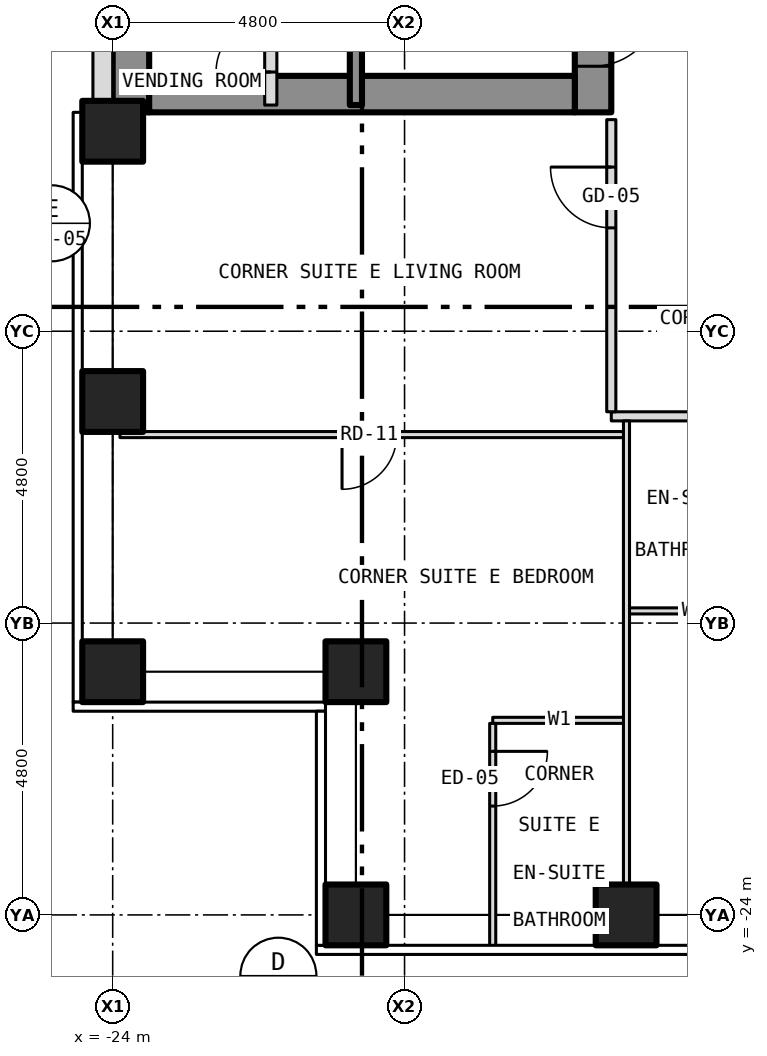
"""IFC4 building model, lengths in metres.
Left out: names, types, materials, properties, quantities, classifications, styles, units other than length and angle.
Written with IfcOpenShell. Run it as: python <this file> out.ifc"""

import sys

from ifc_helpers import new_model, si_unit, direction, frame, frame_2d, origin, origin_2d, place, context, subcontext, project, spatial, rectangle, hollow_rectangle, extrude, element, fill, save


model = new_model("IFC4")
c1 = context("Model", 3, precision=1e-05, world=origin(), true_north=direction((0.0, 1.0)))
c2 = subcontext(c1, "Body", "Model", "MODEL_VIEW")
j1 = project(units=[si_unit("LENGTHUNIT", "METRE"), si_unit("PLANEANGLEUNIT", "RADIAN")], contexts=[c1])
p1 = place(None, origin())
s1 = spatial("IfcSite", under=j1, at=p1, CompositionType="ELEMENT")
p2 = place(p1, origin())
s2 = spatial("IfcBuilding", under=s1, at=p2, CompositionType="ELEMENT")
p3 = place(p2, frame((0.0, 0.0, 60.0)))
s3 = spatial("IfcBuildingStorey", under=s2, at=p3, CompositionType="ELEMENT", Elevation=60.0)
for number, where, z_axis, x_axis in (
    (1, (-20.0, -24.0, -0.15), (0.0, 0.0, 1.0), (1.0, 0.0, 0.0)),
    (2, (-15.556, -24.0, -0.15), (0.0, 0.0, 1.0), (1.0, 0.0, 0.0)),
    (3, (-24.0, -20.0, -0.15), (0.0, 0.0, 1.0), (1.0, 0.0, 0.0)),
    (4, (-24.0, -15.556, -0.15), (0.0, 0.0, 1.0), (1.0, 0.0, 0.0)),
    (5, (-24.0, -11.111, -0.15), (0.0, 0.0, 1.0), (1.0, 0.0, 0.0)),
    (6, (-20.0, -20.0, -0.15), (0.0, 0.0, 1.0), (1.0, 0.0, 0.0)),
):
    element("IfcColumn", number, at=place(p3, frame(where, z_axis=z_axis, x_axis=x_axis)), inside=s3, PredefinedType="COLUMN", context=c2, shape_type="SweptSolid", body=[
        extrude(hollow_rectangle(XDim=1.0, YDim=1.0, WallThickness=0.06, at=origin_2d()), origin(), (0.0, 0.0, 1.0), 3.5),
    ])
p4 = place(p3, frame((-16.1, -10.8, 0.0), z_axis=(0.0, 0.0, 1.0), x_axis=(0.0, 1.0, 0.0)))
e7 = element("IfcWall", 7, at=p4, inside=s3, PredefinedType="SHEAR", context=c2, shape_type="SweptSolid", body=[
    extrude(rectangle(XDim=21.6, YDim=0.6, at=frame_2d((10.8, 0.0))), origin(), (0.0, 0.0, 1.0), 3.25),
])
p5 = place(p4, frame((9.4, 0.0, 0.0)))
e8 = element("IfcOpeningElement", 8, at=p5, cuts=e7, PredefinedType="OPENING", context=c2, shape_type="SweptSolid", body=[
    extrude(rectangle(XDim=1.1, YDim=2.1, at=frame_2d((0.55, 1.05))), frame((0.0, 0.312, 0.0), z_axis=(0.0, -1.0, 0.0), x_axis=(1.0, 0.0, 0.0)), (0.0, 0.0, 1.0), 0.624),
])
p6 = place(p4, frame((11.5, 0.0, 0.0)))
e9 = element("IfcOpeningElement", 9, at=p6, cuts=e7, PredefinedType="OPENING", context=c2, shape_type="SweptSolid", body=[
    extrude(rectangle(XDim=1.1, YDim=2.1, at=frame_2d((0.55, 1.05))), frame((0.0, 0.312, 0.0), z_axis=(0.0, -1.0, 0.0), x_axis=(1.0, 0.0, 0.0)), (0.0, 0.0, 1.0), 0.624),
])
p7 = place(p4, frame((13.6, 0.0, 0.0)))
e10 = element("IfcOpeningElement", 10, at=p7, cuts=e7, PredefinedType="OPENING", context=c2, shape_type="SweptSolid", body=[
    extrude(rectangle(XDim=1.1, YDim=2.1, at=frame_2d((0.55, 1.05))), frame((0.0, 0.312, 0.0), z_axis=(0.0, -1.0, 0.0), x_axis=(1.0, 0.0, 0.0)), (0.0, 0.0, 1.0), 0.624),
])
p8 = place(p4, frame((15.7, 0.0, 0.0)))
e11 = element("IfcOpeningElement", 11, at=p8, cuts=e7, PredefinedType="OPENING", context=c2, shape_type="SweptSolid", body=[
    extrude(rectangle(XDim=1.1, YDim=2.1, at=frame_2d((0.55, 1.05))), frame((0.0, 0.312, 0.0), z_axis=(0.0, -1.0, 0.0), x_axis=(1.0, 0.0, 0.0)), (0.0, 0.0, 1.0), 0.624),
])
p9 = place(p4, frame((17.8, 0.0, 0.0)))
e12 = element("IfcOpeningElement", 12, at=p9, cuts=e7, PredefinedType="OPENING", context=c2, shape_type="SweptSolid", body=[
    extrude(rectangle(XDim=1.1, YDim=2.1, at=frame_2d((0.55, 1.05))), frame((0.0, 0.312, 0.0), z_axis=(0.0, -1.0, 0.0), x_axis=(1.0, 0.0, 0.0)), (0.0, 0.0, 1.0), 0.624),
])
p10 = place(p4, frame((0.758, 0.0, 0.0)))
e13 = element("IfcOpeningElement", 13, at=p10, cuts=e7, PredefinedType="OPENING", context=c2, shape_type="SweptSolid", body=[
    extrude(rectangle(XDim=1.1, YDim=2.1, at=frame_2d((0.55, 1.05))), frame((0.0, 0.312, 0.0), z_axis=(0.0, -1.0, 0.0), x_axis=(1.0, 0.0, 0.0)), (0.0, 0.0, 1.0), 0.624),
])
p11 = place(p4, frame((7.5, 0.0, 0.0)))
e14 = element("IfcOpeningElement", 14, at=p11, cuts=e7, PredefinedType="OPENING", context=c2, shape_type="SweptSolid", body=[
    extrude(rectangle(XDim=1.1, YDim=2.1, at=frame_2d((0.55, 1.05))), frame((0.0, 0.312, 0.0), z_axis=(0.0, -1.0, 0.0), x_axis=(1.0, 0.0, 0.0)), (0.0, 0.0, 1.0), 0.624),
])
p12 = place(p3, frame((-23.7, -10.8, 0.0), z_axis=(0.0, 0.0, 1.0), x_axis=(0.0, 1.0, 0.0)))
e15 = element("IfcWall", 15, at=p12, inside=s3, PredefinedType="SHEAR", context=c2, shape_type="SweptSolid", body=[
    extrude(rectangle(XDim=21.6, YDim=0.6, at=frame_2d((10.8, 0.0))), origin(), (0.0, 0.0, 1.0), 3.25),
])
p13 = place(p3, frame((-23.4, -10.5, 0.0), z_axis=(0.0, 0.0, 1.0), x_axis=(1.0, 0.0, 0.0)))
e16 = element("IfcWall", 16, at=p13, inside=s3, PredefinedType="SHEAR", context=c2, shape_type="SweptSolid", body=[
    extrude(rectangle(XDim=7.0, YDim=0.6, at=frame_2d((3.5, 0.0))), origin(), (0.0, 0.0, 1.0), 3.25),
])
p14 = place(p3, frame((-24.163, 10.8, 0.0), z_axis=(0.0, 0.0, 1.0), x_axis=(0.0, -1.0, 0.0)))
e17 = element("IfcWall", 17, at=p14, inside=s3, PredefinedType="SOLIDWALL", context=c2, shape_type="SweptSolid", body=[
    extrude(rectangle(XDim=21.6, YDim=0.325, at=frame_2d((10.8, 0.0))), origin(), (0.0, 0.0, 1.0), 3.5),
])
p15 = place(p14, frame((18.05, 0.0, 1.0)))
e18 = element("IfcOpeningElement", 18, at=p15, cuts=e17, PredefinedType="OPENING", context=c2, shape_type="SweptSolid", body=[
    extrude(rectangle(XDim=0.6, YDim=1.5, at=frame_2d((0.3, 0.75))), frame((0.0, 0.175, 0.0), z_axis=(0.0, -1.0, 0.0), x_axis=(1.0, 0.0, 0.0)), (0.0, 0.0, 1.0), 0.349),
])
for number, where, z_axis, x_axis in (
    (19, (-17.75, -20.8, 0.0), (0.0, 0.0, 1.0), (1.0, 0.0, 0.0)),
    (20, (-15.55, -19.0, 0.0), (0.0, 0.0, 1.0), (1.0, 0.0, 0.0)),
):
    element("IfcWall", number, at=place(p3, frame(where, z_axis=z_axis, x_axis=x_axis)), inside=s3, PredefinedType="PARTITIONING", context=c2, shape_type="SweptSolid", body=[
        extrude(rectangle(XDim=2.2, YDim=0.1, at=frame_2d((1.1, 0.0))), origin(), (0.0, 0.0, 1.0), 3.35),
    ])
p16 = place(p3, frame((-23.88, -16.1, 0.0), z_axis=(0.0, 0.0, 1.0), x_axis=(1.0, 0.0, 0.0)))
e21 = element("IfcWall", 21, at=p16, inside=s3, PredefinedType="PARTITIONING", context=c2, shape_type="SweptSolid", body=[
    extrude(rectangle(XDim=8.33, YDim=0.1, at=frame_2d((4.165, 0.0))), origin(), (0.0, 0.0, 1.0), 3.35),
])
p17 = place(p16, frame((3.652, 0.0, 0.0)))
e22 = element("IfcOpeningElement", 22, at=p17, cuts=e21, PredefinedType="OPENING", context=c2, shape_type="SweptSolid", body=[
    extrude(rectangle(XDim=0.9, YDim=2.1, at=frame_2d((0.45, 1.05))), frame((0.0, 0.062, 0.0), z_axis=(0.0, -1.0, 0.0), x_axis=(1.0, 0.0, 0.0)), (0.0, 0.0, 1.0), 0.124),
])
p18 = place(p3, frame((-15.8, -15.8, 0.0), z_axis=(0.0, 0.0, 1.0), x_axis=(1.0, 0.0, 0.0)))
e23 = element("IfcWall", 23, at=p18, inside=s3, PredefinedType="PARTITIONING", context=c2, shape_type="SweptSolid", body=[
    extrude(rectangle(XDim=6.68, YDim=0.15, at=frame_2d((3.34, 0.0))), origin(), (0.0, 0.0, 1.0), 3.35),
])
p19 = place(p18, frame((4.047, 0.0, 0.0)))
e24 = element("IfcOpeningElement", 24, at=p19, cuts=e23, PredefinedType="OPENING", context=c2, shape_type="SweptSolid", body=[
    extrude(rectangle(XDim=1.0, YDim=2.1, at=frame_2d((0.5, 1.05))), frame((0.0, 0.087, 0.0), z_axis=(0.0, -1.0, 0.0), x_axis=(1.0, 0.0, 0.0)), (0.0, 0.0, 1.0), 0.174),
])
p20 = place(p3, frame((-21.4, -10.68, 0.0), z_axis=(0.0, 0.0, 1.0), x_axis=(0.0, 1.0, 0.0)))
e25 = element("IfcWall", 25, at=p20, inside=s3, PredefinedType="PARTITIONING", context=c2, shape_type="SweptSolid", body=[
    extrude(rectangle(XDim=8.68, YDim=0.2, at=frame_2d((4.34, 0.0))), origin(), (0.0, 0.0, 1.0), 3.25),
])
p21 = place(p20, frame((0.543, 0.0, 0.0)))
e26 = element("IfcOpeningElement", 26, at=p21, cuts=e25, PredefinedType="OPENING", context=c2, shape_type="SweptSolid", body=[
    extrude(rectangle(XDim=0.9, YDim=2.1, at=frame_2d((0.45, 1.05))), frame((0.0, 0.112, 0.0), z_axis=(0.0, -1.0, 0.0), x_axis=(1.0, 0.0, 0.0)), (0.0, 0.0, 1.0), 0.224),
])
p22 = place(p20, frame((4.993, 0.0, 0.0)))
e27 = element("IfcOpeningElement", 27, at=p22, cuts=e25, PredefinedType="OPENING", context=c2, shape_type="SweptSolid", body=[
    extrude(rectangle(XDim=0.9, YDim=2.1, at=frame_2d((0.45, 1.05))), frame((0.0, 0.112, 0.0), z_axis=(0.0, -1.0, 0.0), x_axis=(1.0, 0.0, 0.0)), (0.0, 0.0, 1.0), 0.224),
])
p23 = place(p3, frame((-20.0, -10.68, 0.0), z_axis=(0.0, 0.0, 1.0), x_axis=(0.0, 1.0, 0.0)))
e28 = element("IfcWall", 28, at=p23, inside=s3, PredefinedType="SHEAR", context=c2, shape_type="SweptSolid", body=[
    extrude(rectangle(XDim=6.98, YDim=0.2, at=frame_2d((3.49, 0.0))), origin(), (0.0, 0.0, 1.0), 3.25),
])
p24 = place(p3, frame((-17.75, -24.53, 0.0), z_axis=(0.0, 0.0, 1.0), x_axis=(0.0, 1.0, 0.0)))
e29 = element("IfcWall", 29, at=p24, inside=s3, PredefinedType="PARTITIONING", context=c2, shape_type="SweptSolid", body=[
    extrude(rectangle(XDim=3.68, YDim=0.1, at=frame_2d((1.84, 0.0))), origin(), (0.0, 0.0, 1.0), 3.35),
])
p25 = place(p24, frame((2.32, 0.0, 0.0)))
e30 = element("IfcOpeningElement", 30, at=p25, cuts=e29, PredefinedType="OPENING", context=c2, shape_type="SweptSolid", body=[
    extrude(rectangle(XDim=0.9, YDim=2.1, at=frame_2d((0.45, 1.05))), frame((0.0, 0.062, 0.0), z_axis=(0.0, -1.0, 0.0), x_axis=(1.0, 0.0, 0.0)), (0.0, 0.0, 1.0), 0.124),
])
p26 = place(p3, frame((-15.8, -15.725, 0.0), z_axis=(0.0, 0.0, 1.0), x_axis=(0.0, 1.0, 0.0)))
e31 = element("IfcWall", 31, at=p26, inside=s3, PredefinedType="PARTITIONING", context=c2, shape_type="SweptSolid", body=[
    extrude(rectangle(XDim=4.805, YDim=0.15, at=frame_2d((2.403, 0.0))), origin(), (0.0, 0.0, 1.0), 3.35),
])
p27 = place(p26, frame((3.025, 0.0, 0.0)))
e32 = element("IfcOpeningElement", 32, at=p27, cuts=e31, PredefinedType="OPENING", context=c2, shape_type="SweptSolid", body=[
    extrude(rectangle(XDim=1.0, YDim=2.1, at=frame_2d((0.5, 1.05))), frame((0.0, 0.087, 0.0), z_axis=(0.0, -1.0, 0.0), x_axis=(1.0, 0.0, 0.0)), (0.0, 0.0, 1.0), 0.174),
])
p28 = place(p3, frame((-15.55, -23.88, 0.0), z_axis=(0.0, 0.0, 1.0), x_axis=(0.0, 1.0, 0.0)))
e33 = element("IfcWall", 33, at=p28, inside=s3, PredefinedType="PARTITIONING", context=c2, shape_type="SweptSolid", body=[
    extrude(rectangle(XDim=8.005, YDim=0.1, at=frame_2d((4.002, 0.0))), origin(), (0.0, 0.0, 1.0), 3.35),
])
p29 = place(p10, origin())
e34 = element("IfcDoor", 34, at=p29, inside=s3, OperationType="SINGLE_SWING_RIGHT", PredefinedType="DOOR", context=c2, shape_type="SweptSolid", body=[
    extrude(rectangle(XDim=1.1, YDim=2.1, at=frame_2d((0.55, 1.05))), frame((0.0, 0.025, 0.0), z_axis=(0.0, -1.0, 0.0), x_axis=(1.0, 0.0, 0.0)), (0.0, 0.0, 1.0), 0.05),
])
fill(e13, e34)
p30 = place(p21, origin())
e35 = element("IfcDoor", 35, at=p30, inside=s3, OperationType="SINGLE_SWING_LEFT", PredefinedType="DOOR", context=c2, shape_type="SweptSolid", body=[
    extrude(rectangle(XDim=0.9, YDim=2.1, at=frame_2d((0.45, 1.05))), frame((0.0, 0.025, 0.0), z_axis=(0.0, -1.0, 0.0), x_axis=(1.0, 0.0, 0.0)), (0.0, 0.0, 1.0), 0.05),
])
fill(e26, e35)
p31 = place(p27, origin())
e36 = element("IfcDoor", 36, at=p31, inside=s3, OperationType="SINGLE_SWING_RIGHT", PredefinedType="DOOR", context=c2, shape_type="SweptSolid", body=[
    extrude(rectangle(XDim=1.0, YDim=2.1, at=frame_2d((0.5, 1.05))), frame((0.0, 0.025, 0.0), z_axis=(0.0, -1.0, 0.0), x_axis=(1.0, 0.0, 0.0)), (0.0, 0.0, 1.0), 0.05),
])
fill(e32, e36)
p32 = place(p17, origin())
e37 = element("IfcDoor", 37, at=p32, inside=s3, OperationType="SINGLE_SWING_LEFT", PredefinedType="DOOR", context=c2, shape_type="SweptSolid", body=[
    extrude(rectangle(XDim=0.9, YDim=2.1, at=frame_2d((0.45, 1.05))), frame((0.0, 0.025, 0.0), z_axis=(0.0, -1.0, 0.0), x_axis=(1.0, 0.0, 0.0)), (0.0, 0.0, 1.0), 0.05),
])
fill(e22, e37)
p33 = place(p25, origin())
e38 = element("IfcDoor", 38, at=p33, inside=s3, OperationType="SINGLE_SWING_RIGHT", PredefinedType="DOOR", context=c2, shape_type="SweptSolid", body=[
    extrude(rectangle(XDim=0.9, YDim=2.1, at=frame_2d((0.45, 1.05))), frame((0.0, 0.025, 0.0), z_axis=(0.0, -1.0, 0.0), x_axis=(1.0, 0.0, 0.0)), (0.0, 0.0, 1.0), 0.05),
])
fill(e30, e38)
save(model, sys.argv[1])
